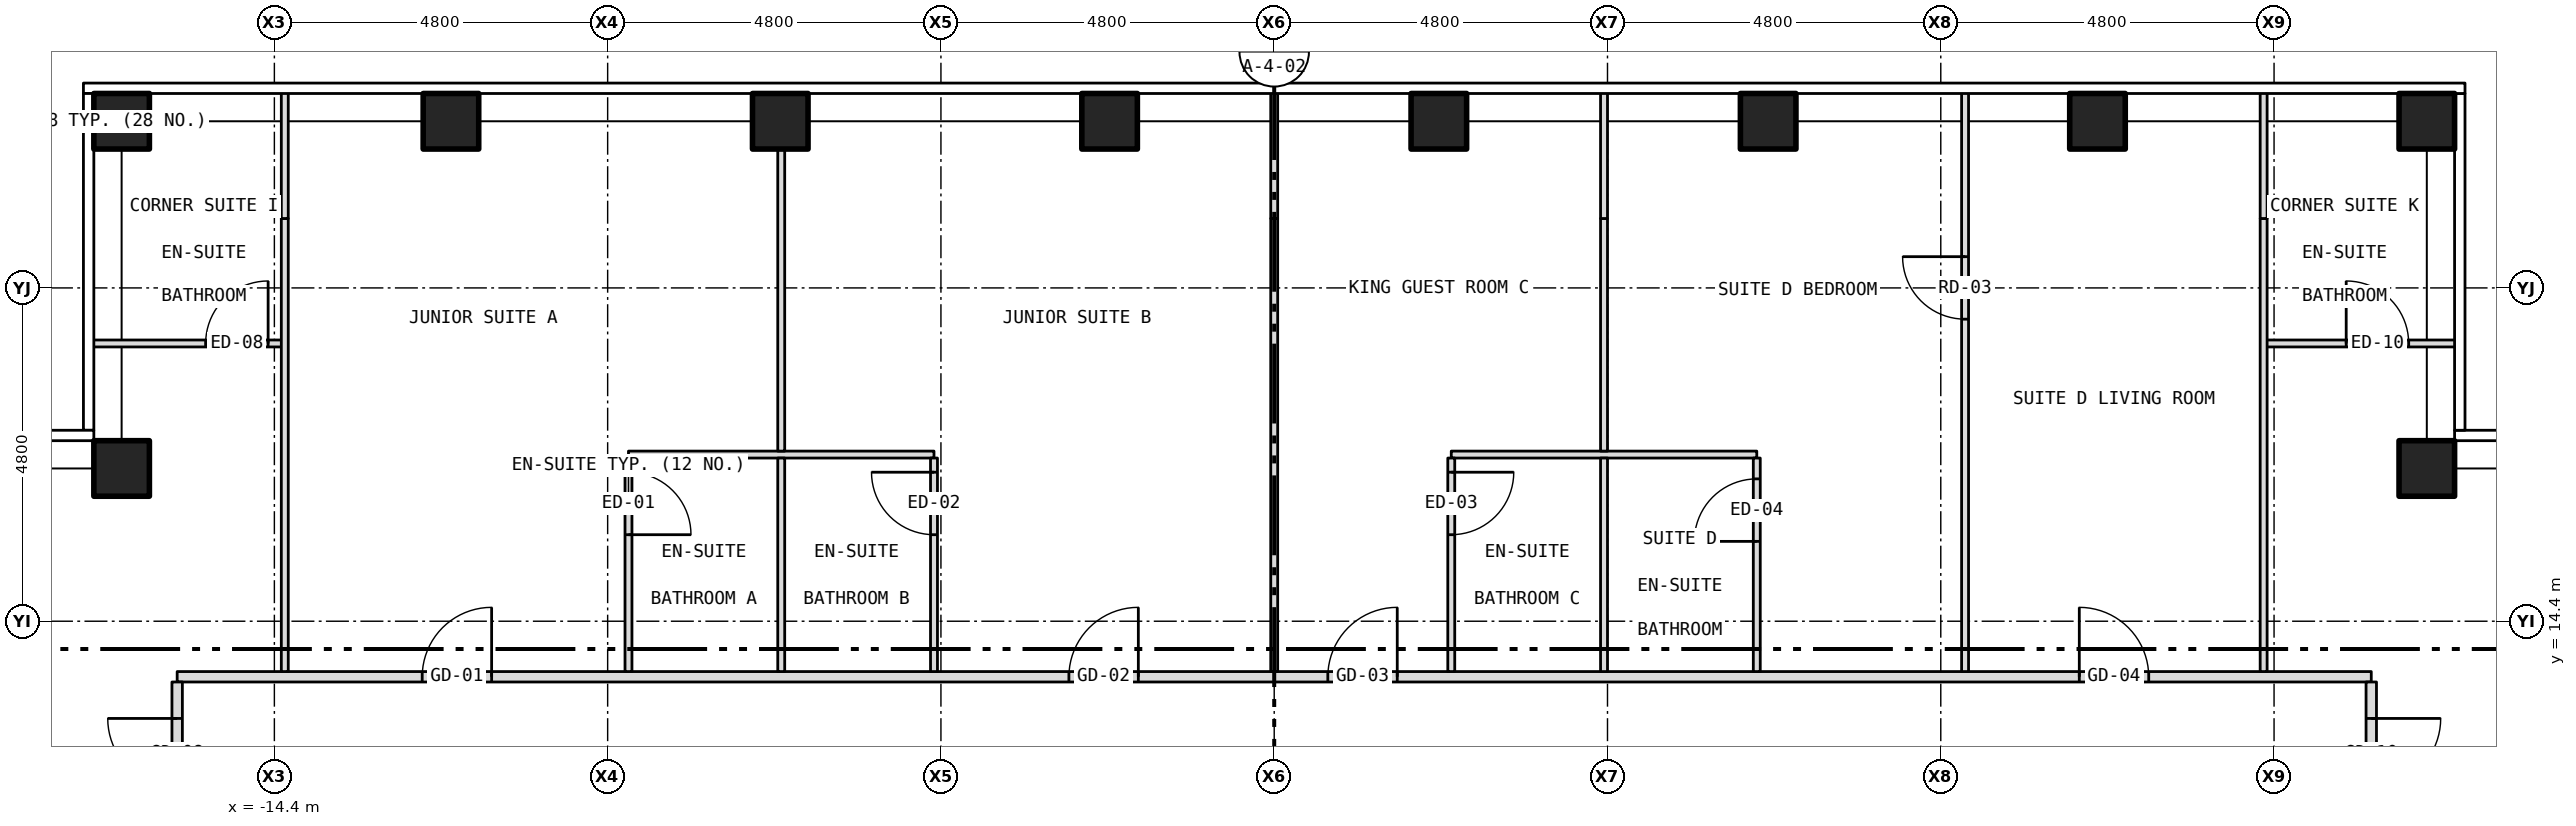
"""IFC4 building model, lengths in metres.
Left out: names, types, materials, properties, quantities, classifications, styles, units other than length and angle.
Written with IfcOpenShell. Run it as: python <this file> out.ifc"""

import sys

from ifc_helpers import new_model, si_unit, direction, frame, frame_2d, origin, origin_2d, place, context, subcontext, project, spatial, rectangle, hollow_rectangle, extrude, element, fill, save


model = new_model("IFC4")
c1 = context("Model", 3, precision=1e-05, world=origin(), true_north=direction((0.0, 1.0)))
c2 = subcontext(c1, "Body", "Model", "MODEL_VIEW")
j1 = project(units=[si_unit("LENGTHUNIT", "METRE"), si_unit("PLANEANGLEUNIT", "RADIAN")], contexts=[c1])
p1 = place(None, origin())
s1 = spatial("IfcSite", under=j1, at=p1, CompositionType="ELEMENT")
p2 = place(p1, origin())
s2 = spatial("IfcBuilding", under=s1, at=p2, CompositionType="ELEMENT")
p3 = place(p2, frame((0.0, 0.0, 183.0)))
s3 = spatial("IfcBuildingStorey", under=s2, at=p3, CompositionType="ELEMENT", Elevation=183.0)
for number, where, z_axis, x_axis in (
    (1, (-16.6, 21.6, -0.15), (0.0, 0.0, 1.0), (1.0, 0.0, 0.0)),
    (2, (-11.857, 21.6, -0.15), (0.0, 0.0, 1.0), (1.0, 0.0, 0.0)),
    (3, (-7.114, 21.6, -0.15), (0.0, 0.0, 1.0), (1.0, 0.0, 0.0)),
    (4, (-2.371, 21.6, -0.15), (0.0, 0.0, 1.0), (1.0, 0.0, 0.0)),
    (5, (2.371, 21.6, -0.15), (0.0, 0.0, 1.0), (1.0, 0.0, 0.0)),
    (6, (7.114, 21.6, -0.15), (0.0, 0.0, 1.0), (1.0, 0.0, 0.0)),
    (7, (11.857, 21.6, -0.15), (0.0, 0.0, 1.0), (1.0, 0.0, 0.0)),
    (8, (16.6, 21.6, -0.15), (0.0, 0.0, 1.0), (1.0, 0.0, 0.0)),
    (9, (-16.6, 16.6, -0.15), (0.0, 0.0, 1.0), (1.0, 0.0, 0.0)),
    (10, (16.6, 16.6, -0.15), (0.0, 0.0, 1.0), (1.0, 0.0, 0.0)),
):
    element("IfcColumn", number, at=place(p3, frame(where, z_axis=z_axis, x_axis=x_axis)), inside=s3, PredefinedType="COLUMN", context=c2, shape_type="SweptSolid", body=[
        extrude(hollow_rectangle(XDim=0.8, YDim=0.8, WallThickness=0.045, at=origin_2d()), origin(), (0.0, 0.0, 1.0), 3.35),
    ])
p4 = place(p3, frame((-15.8, 13.6, 0.0), z_axis=(0.0, 0.0, 1.0), x_axis=(1.0, 0.0, 0.0)))
e11 = element("IfcWall", 11, at=p4, inside=s3, PredefinedType="PARTITIONING", context=c2, shape_type="SweptSolid", body=[
    extrude(rectangle(XDim=31.6, YDim=0.15, at=frame_2d((15.8, 0.0))), origin(), (0.0, 0.0, 1.0), 3.2),
])
p5 = place(p4, frame((3.529, 0.0, 0.0)))
e12 = element("IfcOpeningElement", 12, at=p5, cuts=e11, PredefinedType="OPENING", context=c2, shape_type="SweptSolid", body=[
    extrude(rectangle(XDim=1.0, YDim=2.1, at=frame_2d((0.5, 1.05))), frame((0.0, 0.087, 0.0), z_axis=(0.0, -1.0, 0.0), x_axis=(1.0, 0.0, 0.0)), (0.0, 0.0, 1.0), 0.174),
])
p6 = place(p4, frame((12.843, 0.0, 0.0)))
e13 = element("IfcOpeningElement", 13, at=p6, cuts=e11, PredefinedType="OPENING", context=c2, shape_type="SweptSolid", body=[
    extrude(rectangle(XDim=1.0, YDim=2.1, at=frame_2d((0.5, 1.05))), frame((0.0, 0.087, 0.0), z_axis=(0.0, -1.0, 0.0), x_axis=(1.0, 0.0, 0.0)), (0.0, 0.0, 1.0), 0.174),
])
p7 = place(p4, frame((16.572, 0.0, 0.0)))
e14 = element("IfcOpeningElement", 14, at=p7, cuts=e11, PredefinedType="OPENING", context=c2, shape_type="SweptSolid", body=[
    extrude(rectangle(XDim=1.0, YDim=2.1, at=frame_2d((0.5, 1.05))), frame((0.0, 0.087, 0.0), z_axis=(0.0, -1.0, 0.0), x_axis=(1.0, 0.0, 0.0)), (0.0, 0.0, 1.0), 0.174),
])
p8 = place(p4, frame((27.395, 0.0, 0.0)))
e15 = element("IfcOpeningElement", 15, at=p8, cuts=e11, PredefinedType="OPENING", context=c2, shape_type="SweptSolid", body=[
    extrude(rectangle(XDim=1.0, YDim=2.1, at=frame_2d((0.5, 1.05))), frame((0.0, 0.087, 0.0), z_axis=(0.0, -1.0, 0.0), x_axis=(1.0, 0.0, 0.0)), (0.0, 0.0, 1.0), 0.174),
])
p9 = place(p3, frame((-9.3, 16.8, 0.0), z_axis=(0.0, 0.0, 1.0), x_axis=(1.0, 0.0, 0.0)))
e16 = element("IfcWall", 16, at=p9, inside=s3, PredefinedType="PARTITIONING", context=c2, shape_type="SweptSolid", body=[
    extrude(rectangle(XDim=4.4, YDim=0.1, at=frame_2d((2.2, 0.0))), origin(), (0.0, 0.0, 1.0), 3.2),
])
p10 = place(p3, frame((2.55, 16.8, 0.0), z_axis=(0.0, 0.0, 1.0), x_axis=(1.0, 0.0, 0.0)))
e17 = element("IfcWall", 17, at=p10, inside=s3, PredefinedType="PARTITIONING", context=c2, shape_type="SweptSolid", body=[
    extrude(rectangle(XDim=4.4, YDim=0.1, at=frame_2d((2.2, 0.0))), origin(), (0.0, 0.0, 1.0), 3.2),
])
p11 = place(p3, frame((-17.03, 18.4, 0.0), z_axis=(0.0, 0.0, 1.0), x_axis=(1.0, 0.0, 0.0)))
e18 = element("IfcWall", 18, at=p11, inside=s3, PredefinedType="PARTITIONING", context=c2, shape_type="SweptSolid", body=[
    extrude(rectangle(XDim=2.78, YDim=0.1, at=frame_2d((1.39, 0.0))), origin(), (0.0, 0.0, 1.0), 3.2),
])
p12 = place(p11, frame((1.64, 0.0, 0.0)))
e19 = element("IfcOpeningElement", 19, at=p12, cuts=e18, PredefinedType="OPENING", context=c2, shape_type="SweptSolid", body=[
    extrude(rectangle(XDim=0.9, YDim=2.1, at=frame_2d((0.45, 1.05))), frame((0.0, 0.062, 0.0), z_axis=(0.0, -1.0, 0.0), x_axis=(1.0, 0.0, 0.0)), (0.0, 0.0, 1.0), 0.124),
])
p13 = place(p3, frame((14.25, 18.4, 0.0), z_axis=(0.0, 0.0, 1.0), x_axis=(1.0, 0.0, 0.0)))
e20 = element("IfcWall", 20, at=p13, inside=s3, PredefinedType="PARTITIONING", context=c2, shape_type="SweptSolid", body=[
    extrude(rectangle(XDim=2.78, YDim=0.1, at=frame_2d((1.39, 0.0))), origin(), (0.0, 0.0, 1.0), 3.2),
])
p14 = place(p13, frame((1.189, 0.0, 0.0)))
e21 = element("IfcOpeningElement", 21, at=p14, cuts=e20, PredefinedType="OPENING", context=c2, shape_type="SweptSolid", body=[
    extrude(rectangle(XDim=0.9, YDim=2.1, at=frame_2d((0.45, 1.05))), frame((0.0, 0.062, 0.0), z_axis=(0.0, -1.0, 0.0), x_axis=(1.0, 0.0, 0.0)), (0.0, 0.0, 1.0), 0.124),
])
p15 = place(p3, frame((-15.8, 10.92, 0.0), z_axis=(0.0, 0.0, 1.0), x_axis=(0.0, 1.0, 0.0)))
e22 = element("IfcWall", 22, at=p15, inside=s3, PredefinedType="PARTITIONING", context=c2, shape_type="SweptSolid", body=[
    extrude(rectangle(XDim=2.605, YDim=0.15, at=frame_2d((1.302, 0.0))), origin(), (0.0, 0.0, 1.0), 3.2),
])
p16 = place(p15, frame((1.08, 0.0, 0.0)))
e23 = element("IfcOpeningElement", 23, at=p16, cuts=e22, PredefinedType="OPENING", context=c2, shape_type="SweptSolid", body=[
    extrude(rectangle(XDim=1.0, YDim=2.1, at=frame_2d((0.5, 1.05))), frame((0.0, 0.087, 0.0), z_axis=(0.0, -1.0, 0.0), x_axis=(1.0, 0.0, 0.0)), (0.0, 0.0, 1.0), 0.174),
])
p17 = place(p3, frame((-14.25, 13.675, 0.0), z_axis=(0.0, 0.0, 1.0), x_axis=(0.0, 1.0, 0.0)))
e24 = element("IfcWall", 24, at=p17, inside=s3, PredefinedType="PARTITIONING", context=c2, shape_type="SweptSolid", body=[
    extrude(rectangle(XDim=6.525, YDim=0.1, at=frame_2d((3.262, 0.0))), origin(), (0.0, 0.0, 1.0), 2.667),
])
p18 = place(p3, frame((-14.25, 20.199, 0.0), z_axis=(0.0, 0.0, 1.0), x_axis=(0.0, 1.0, 0.0)))
e25 = element("IfcWall", 25, at=p18, inside=s3, PredefinedType="PARTITIONING", context=c2, shape_type="SweptSolid", body=[
    extrude(rectangle(XDim=1.831, YDim=0.1, at=frame_2d((0.915, 0.0))), origin(), (0.0, 0.0, 1.0), 3.2),
])
p19 = place(p3, frame((-9.3, 13.675, 0.0), z_axis=(0.0, 0.0, 1.0), x_axis=(0.0, 1.0, 0.0)))
e26 = element("IfcWall", 26, at=p19, inside=s3, PredefinedType="PARTITIONING", context=c2, shape_type="SweptSolid", body=[
    extrude(rectangle(XDim=3.075, YDim=0.1, at=frame_2d((1.538, 0.0))), origin(), (0.0, 0.0, 1.0), 3.2),
])
p20 = place(p19, frame((1.971, 0.0, 0.0)))
e27 = element("IfcOpeningElement", 27, at=p20, cuts=e26, PredefinedType="OPENING", context=c2, shape_type="SweptSolid", body=[
    extrude(rectangle(XDim=0.9, YDim=2.1, at=frame_2d((0.45, 1.05))), frame((0.0, 0.062, 0.0), z_axis=(0.0, -1.0, 0.0), x_axis=(1.0, 0.0, 0.0)), (0.0, 0.0, 1.0), 0.124),
])
p21 = place(p3, frame((-7.1, 13.675, 0.0), z_axis=(0.0, 0.0, 1.0), x_axis=(0.0, 1.0, 0.0)))
e28 = element("IfcWall", 28, at=p21, inside=s3, PredefinedType="PARTITIONING", context=c2, shape_type="SweptSolid", body=[
    extrude(rectangle(XDim=3.075, YDim=0.1, at=frame_2d((1.538, 0.0))), origin(), (0.0, 0.0, 1.0), 3.2),
])
p22 = place(p3, frame((-7.1, 16.85, 0.0), z_axis=(0.0, 0.0, 1.0), x_axis=(0.0, 1.0, 0.0)))
e29 = element("IfcWall", 29, at=p22, inside=s3, PredefinedType="PARTITIONING", context=c2, shape_type="SweptSolid", body=[
    extrude(rectangle(XDim=4.63, YDim=0.1, at=frame_2d((2.315, 0.0))), origin(), (0.0, 0.0, 1.0), 3.2),
])
p23 = place(p3, frame((-4.9, 13.675, 0.0), z_axis=(0.0, 0.0, 1.0), x_axis=(0.0, 1.0, 0.0)))
e30 = element("IfcWall", 30, at=p23, inside=s3, PredefinedType="PARTITIONING", context=c2, shape_type="SweptSolid", body=[
    extrude(rectangle(XDim=3.075, YDim=0.1, at=frame_2d((1.538, 0.0))), origin(), (0.0, 0.0, 1.0), 2.667),
])
p24 = place(p23, frame((1.971, 0.0, 0.0)))
e31 = element("IfcOpeningElement", 31, at=p24, cuts=e30, PredefinedType="OPENING", context=c2, shape_type="SweptSolid", body=[
    extrude(rectangle(XDim=0.9, YDim=2.1, at=frame_2d((0.45, 1.05))), frame((0.0, 0.062, 0.0), z_axis=(0.0, -1.0, 0.0), x_axis=(1.0, 0.0, 0.0)), (0.0, 0.0, 1.0), 0.124),
])
p25 = place(p3, frame((0.0, 13.675, 0.0), z_axis=(0.0, 0.0, 1.0), x_axis=(0.0, 1.0, 0.0)))
e32 = element("IfcWall", 32, at=p25, inside=s3, PredefinedType="PARTITIONING", context=c2, shape_type="SweptSolid", body=[
    extrude(rectangle(XDim=6.525, YDim=0.1, at=frame_2d((3.262, 0.0))), origin(), (0.0, 0.0, 1.0), 2.578),
])
p26 = place(p3, frame((0.0, 20.199, 0.0), z_axis=(0.0, 0.0, 1.0), x_axis=(0.0, 1.0, 0.0)))
e33 = element("IfcWall", 33, at=p26, inside=s3, PredefinedType="PARTITIONING", context=c2, shape_type="SweptSolid", body=[
    extrude(rectangle(XDim=1.831, YDim=0.1, at=frame_2d((0.915, 0.0))), origin(), (0.0, 0.0, 1.0), 3.2),
])
p27 = place(p3, frame((2.55, 13.675, 0.0), z_axis=(0.0, 0.0, 1.0), x_axis=(0.0, 1.0, 0.0)))
e34 = element("IfcWall", 34, at=p27, inside=s3, PredefinedType="PARTITIONING", context=c2, shape_type="SweptSolid", body=[
    extrude(rectangle(XDim=3.075, YDim=0.1, at=frame_2d((1.538, 0.0))), origin(), (0.0, 0.0, 1.0), 3.2),
])
p28 = place(p27, frame((1.971, 0.0, 0.0)))
e35 = element("IfcOpeningElement", 35, at=p28, cuts=e34, PredefinedType="OPENING", context=c2, shape_type="SweptSolid", body=[
    extrude(rectangle(XDim=0.9, YDim=2.1, at=frame_2d((0.45, 1.05))), frame((0.0, 0.062, 0.0), z_axis=(0.0, -1.0, 0.0), x_axis=(1.0, 0.0, 0.0)), (0.0, 0.0, 1.0), 0.124),
])
p29 = place(p3, frame((4.75, 13.675, 0.0), z_axis=(0.0, 0.0, 1.0), x_axis=(0.0, 1.0, 0.0)))
e36 = element("IfcWall", 36, at=p29, inside=s3, PredefinedType="PARTITIONING", context=c2, shape_type="SweptSolid", body=[
    extrude(rectangle(XDim=3.075, YDim=0.1, at=frame_2d((1.538, 0.0))), origin(), (0.0, 0.0, 1.0), 2.667),
])
p30 = place(p3, frame((4.75, 16.85, 0.0), z_axis=(0.0, 0.0, 1.0), x_axis=(0.0, 1.0, 0.0)))
e37 = element("IfcWall", 37, at=p30, inside=s3, PredefinedType="PARTITIONING", context=c2, shape_type="SweptSolid", body=[
    extrude(rectangle(XDim=3.35, YDim=0.1, at=frame_2d((1.675, 0.0))), origin(), (0.0, 0.0, 1.0), 2.667),
])
p31 = place(p3, frame((4.75, 20.199, 0.0), z_axis=(0.0, 0.0, 1.0), x_axis=(0.0, 1.0, 0.0)))
e38 = element("IfcWall", 38, at=p31, inside=s3, PredefinedType="PARTITIONING", context=c2, shape_type="SweptSolid", body=[
    extrude(rectangle(XDim=1.831, YDim=0.1, at=frame_2d((0.915, 0.0))), origin(), (0.0, 0.0, 1.0), 3.2),
])
p32 = place(p3, frame((6.95, 13.675, 0.0), z_axis=(0.0, 0.0, 1.0), x_axis=(0.0, 1.0, 0.0)))
e39 = element("IfcWall", 39, at=p32, inside=s3, PredefinedType="PARTITIONING", context=c2, shape_type="SweptSolid", body=[
    extrude(rectangle(XDim=3.075, YDim=0.1, at=frame_2d((1.538, 0.0))), origin(), (0.0, 0.0, 1.0), 3.2),
])
p33 = place(p32, frame((1.875, 0.0, 0.0)))
e40 = element("IfcOpeningElement", 40, at=p33, cuts=e39, PredefinedType="OPENING", context=c2, shape_type="SweptSolid", body=[
    extrude(rectangle(XDim=0.9, YDim=2.1, at=frame_2d((0.45, 1.05))), frame((0.0, 0.062, 0.0), z_axis=(0.0, -1.0, 0.0), x_axis=(1.0, 0.0, 0.0)), (0.0, 0.0, 1.0), 0.124),
])
p34 = place(p3, frame((9.95, 13.675, 0.0), z_axis=(0.0, 0.0, 1.0), x_axis=(0.0, 1.0, 0.0)))
e41 = element("IfcWall", 41, at=p34, inside=s3, PredefinedType="PARTITIONING", context=c2, shape_type="SweptSolid", body=[
    extrude(rectangle(XDim=8.355, YDim=0.1, at=frame_2d((4.177, 0.0))), origin(), (0.0, 0.0, 1.0), 3.2),
])
p35 = place(p34, frame((5.075, 0.0, 0.0)))
e42 = element("IfcOpeningElement", 42, at=p35, cuts=e41, PredefinedType="OPENING", context=c2, shape_type="SweptSolid", body=[
    extrude(rectangle(XDim=0.9, YDim=2.1, at=frame_2d((0.45, 1.05))), frame((0.0, 0.062, 0.0), z_axis=(0.0, -1.0, 0.0), x_axis=(1.0, 0.0, 0.0)), (0.0, 0.0, 1.0), 0.124),
])
p36 = place(p3, frame((14.25, 13.675, 0.0), z_axis=(0.0, 0.0, 1.0), x_axis=(0.0, 1.0, 0.0)))
e43 = element("IfcWall", 43, at=p36, inside=s3, PredefinedType="PARTITIONING", context=c2, shape_type="SweptSolid", body=[
    extrude(rectangle(XDim=6.525, YDim=0.1, at=frame_2d((3.262, 0.0))), origin(), (0.0, 0.0, 1.0), 2.667),
])
p37 = place(p3, frame((14.25, 20.199, 0.0), z_axis=(0.0, 0.0, 1.0), x_axis=(0.0, 1.0, 0.0)))
e44 = element("IfcWall", 44, at=p37, inside=s3, PredefinedType="PARTITIONING", context=c2, shape_type="SweptSolid", body=[
    extrude(rectangle(XDim=1.831, YDim=0.1, at=frame_2d((0.915, 0.0))), origin(), (0.0, 0.0, 1.0), 3.2),
])
p38 = place(p3, frame((15.8, 10.92, 0.0), z_axis=(0.0, 0.0, 1.0), x_axis=(0.0, 1.0, 0.0)))
e45 = element("IfcWall", 45, at=p38, inside=s3, PredefinedType="PARTITIONING", context=c2, shape_type="SweptSolid", body=[
    extrude(rectangle(XDim=2.605, YDim=0.15, at=frame_2d((1.302, 0.0))), origin(), (0.0, 0.0, 1.0), 3.2),
])
p39 = place(p38, frame((1.08, 0.0, 0.0)))
e46 = element("IfcOpeningElement", 46, at=p39, cuts=e45, PredefinedType="OPENING", context=c2, shape_type="SweptSolid", body=[
    extrude(rectangle(XDim=1.0, YDim=2.1, at=frame_2d((0.5, 1.05))), frame((0.0, 0.087, 0.0), z_axis=(0.0, -1.0, 0.0), x_axis=(1.0, 0.0, 0.0)), (0.0, 0.0, 1.0), 0.174),
])
p40 = place(p5, origin())
e47 = element("IfcDoor", 47, at=p40, inside=s3, OperationType="SINGLE_SWING_RIGHT", PredefinedType="DOOR", context=c2, shape_type="SweptSolid", body=[
    extrude(rectangle(XDim=1.0, YDim=2.1, at=frame_2d((0.5, 1.05))), frame((0.0, 0.025, 0.0), z_axis=(0.0, -1.0, 0.0), x_axis=(1.0, 0.0, 0.0)), (0.0, 0.0, 1.0), 0.05),
])
fill(e12, e47)
p41 = place(p20, origin())
e48 = element("IfcDoor", 48, at=p41, inside=s3, OperationType="SINGLE_SWING_LEFT", PredefinedType="DOOR", context=c2, shape_type="SweptSolid", body=[
    extrude(rectangle(XDim=0.9, YDim=2.1, at=frame_2d((0.45, 1.05))), frame((0.0, 0.025, 0.0), z_axis=(0.0, -1.0, 0.0), x_axis=(1.0, 0.0, 0.0)), (0.0, 0.0, 1.0), 0.05),
])
fill(e27, e48)
p42 = place(p6, origin())
e49 = element("IfcDoor", 49, at=p42, inside=s3, OperationType="SINGLE_SWING_RIGHT", PredefinedType="DOOR", context=c2, shape_type="SweptSolid", body=[
    extrude(rectangle(XDim=1.0, YDim=2.1, at=frame_2d((0.5, 1.05))), frame((0.0, 0.025, 0.0), z_axis=(0.0, -1.0, 0.0), x_axis=(1.0, 0.0, 0.0)), (0.0, 0.0, 1.0), 0.05),
])
fill(e13, e49)
p43 = place(p24, origin())
e50 = element("IfcDoor", 50, at=p43, inside=s3, OperationType="SINGLE_SWING_RIGHT", PredefinedType="DOOR", context=c2, shape_type="SweptSolid", body=[
    extrude(rectangle(XDim=0.9, YDim=2.1, at=frame_2d((0.45, 1.05))), frame((0.0, 0.025, 0.0), z_axis=(0.0, -1.0, 0.0), x_axis=(1.0, 0.0, 0.0)), (0.0, 0.0, 1.0), 0.05),
])
fill(e31, e50)
p44 = place(p7, origin())
e51 = element("IfcDoor", 51, at=p44, inside=s3, OperationType="SINGLE_SWING_RIGHT", PredefinedType="DOOR", context=c2, shape_type="SweptSolid", body=[
    extrude(rectangle(XDim=1.0, YDim=2.1, at=frame_2d((0.5, 1.05))), frame((0.0, 0.025, 0.0), z_axis=(0.0, -1.0, 0.0), x_axis=(1.0, 0.0, 0.0)), (0.0, 0.0, 1.0), 0.05),
])
fill(e14, e51)
p45 = place(p28, origin())
e52 = element("IfcDoor", 52, at=p45, inside=s3, OperationType="SINGLE_SWING_RIGHT", PredefinedType="DOOR", context=c2, shape_type="SweptSolid", body=[
    extrude(rectangle(XDim=0.9, YDim=2.1, at=frame_2d((0.45, 1.05))), frame((0.0, 0.025, 0.0), z_axis=(0.0, -1.0, 0.0), x_axis=(1.0, 0.0, 0.0)), (0.0, 0.0, 1.0), 0.05),
])
fill(e35, e52)
p46 = place(p8, origin())
e53 = element("IfcDoor", 53, at=p46, inside=s3, OperationType="SINGLE_SWING_LEFT", PredefinedType="DOOR", context=c2, shape_type="SweptSolid", body=[
    extrude(rectangle(XDim=1.0, YDim=2.1, at=frame_2d((0.5, 1.05))), frame((0.0, 0.025, 0.0), z_axis=(0.0, -1.0, 0.0), x_axis=(1.0, 0.0, 0.0)), (0.0, 0.0, 1.0), 0.05),
])
fill(e15, e53)
p47 = place(p35, origin())
e54 = element("IfcDoor", 54, at=p47, inside=s3, OperationType="SINGLE_SWING_RIGHT", PredefinedType="DOOR", context=c2, shape_type="SweptSolid", body=[
    extrude(rectangle(XDim=0.9, YDim=2.1, at=frame_2d((0.45, 1.05))), frame((0.0, 0.025, 0.0), z_axis=(0.0, -1.0, 0.0), x_axis=(1.0, 0.0, 0.0)), (0.0, 0.0, 1.0), 0.05),
])
fill(e42, e54)
p48 = place(p33, origin())
e55 = element("IfcDoor", 55, at=p48, inside=s3, OperationType="SINGLE_SWING_LEFT", PredefinedType="DOOR", context=c2, shape_type="SweptSolid", body=[
    extrude(rectangle(XDim=0.9, YDim=2.1, at=frame_2d((0.45, 1.05))), frame((0.0, 0.025, 0.0), z_axis=(0.0, -1.0, 0.0), x_axis=(1.0, 0.0, 0.0)), (0.0, 0.0, 1.0), 0.05),
])
fill(e40, e55)
p49 = place(p12, origin())
e56 = element("IfcDoor", 56, at=p49, inside=s3, OperationType="SINGLE_SWING_RIGHT", PredefinedType="DOOR", context=c2, shape_type="SweptSolid", body=[
    extrude(rectangle(XDim=0.9, YDim=2.1, at=frame_2d((0.45, 1.05))), frame((0.0, 0.025, 0.0), z_axis=(0.0, -1.0, 0.0), x_axis=(1.0, 0.0, 0.0)), (0.0, 0.0, 1.0), 0.05),
])
fill(e19, e56)
p50 = place(p16, origin())
e57 = element("IfcDoor", 57, at=p50, inside=s3, OperationType="SINGLE_SWING_RIGHT", PredefinedType="DOOR", context=c2, shape_type="SweptSolid", body=[
    extrude(rectangle(XDim=1.0, YDim=2.1, at=frame_2d((0.5, 1.05))), frame((0.0, 0.025, 0.0), z_axis=(0.0, -1.0, 0.0), x_axis=(1.0, 0.0, 0.0)), (0.0, 0.0, 1.0), 0.05),
])
fill(e23, e57)
p51 = place(p14, origin())
e58 = element("IfcDoor", 58, at=p51, inside=s3, OperationType="SINGLE_SWING_LEFT", PredefinedType="DOOR", context=c2, shape_type="SweptSolid", body=[
    extrude(rectangle(XDim=0.9, YDim=2.1, at=frame_2d((0.45, 1.05))), frame((0.0, 0.025, 0.0), z_axis=(0.0, -1.0, 0.0), x_axis=(1.0, 0.0, 0.0)), (0.0, 0.0, 1.0), 0.05),
])
fill(e21, e58)
p52 = place(p39, origin())
e59 = element("IfcDoor", 59, at=p52, inside=s3, OperationType="SINGLE_SWING_RIGHT", PredefinedType="DOOR", context=c2, shape_type="SweptSolid", body=[
    extrude(rectangle(XDim=1.0, YDim=2.1, at=frame_2d((0.5, 1.05))), frame((0.0, 0.025, 0.0), z_axis=(0.0, -1.0, 0.0), x_axis=(1.0, 0.0, 0.0)), (0.0, 0.0, 1.0), 0.05),
])
fill(e46, e59)
save(model, sys.argv[1])
